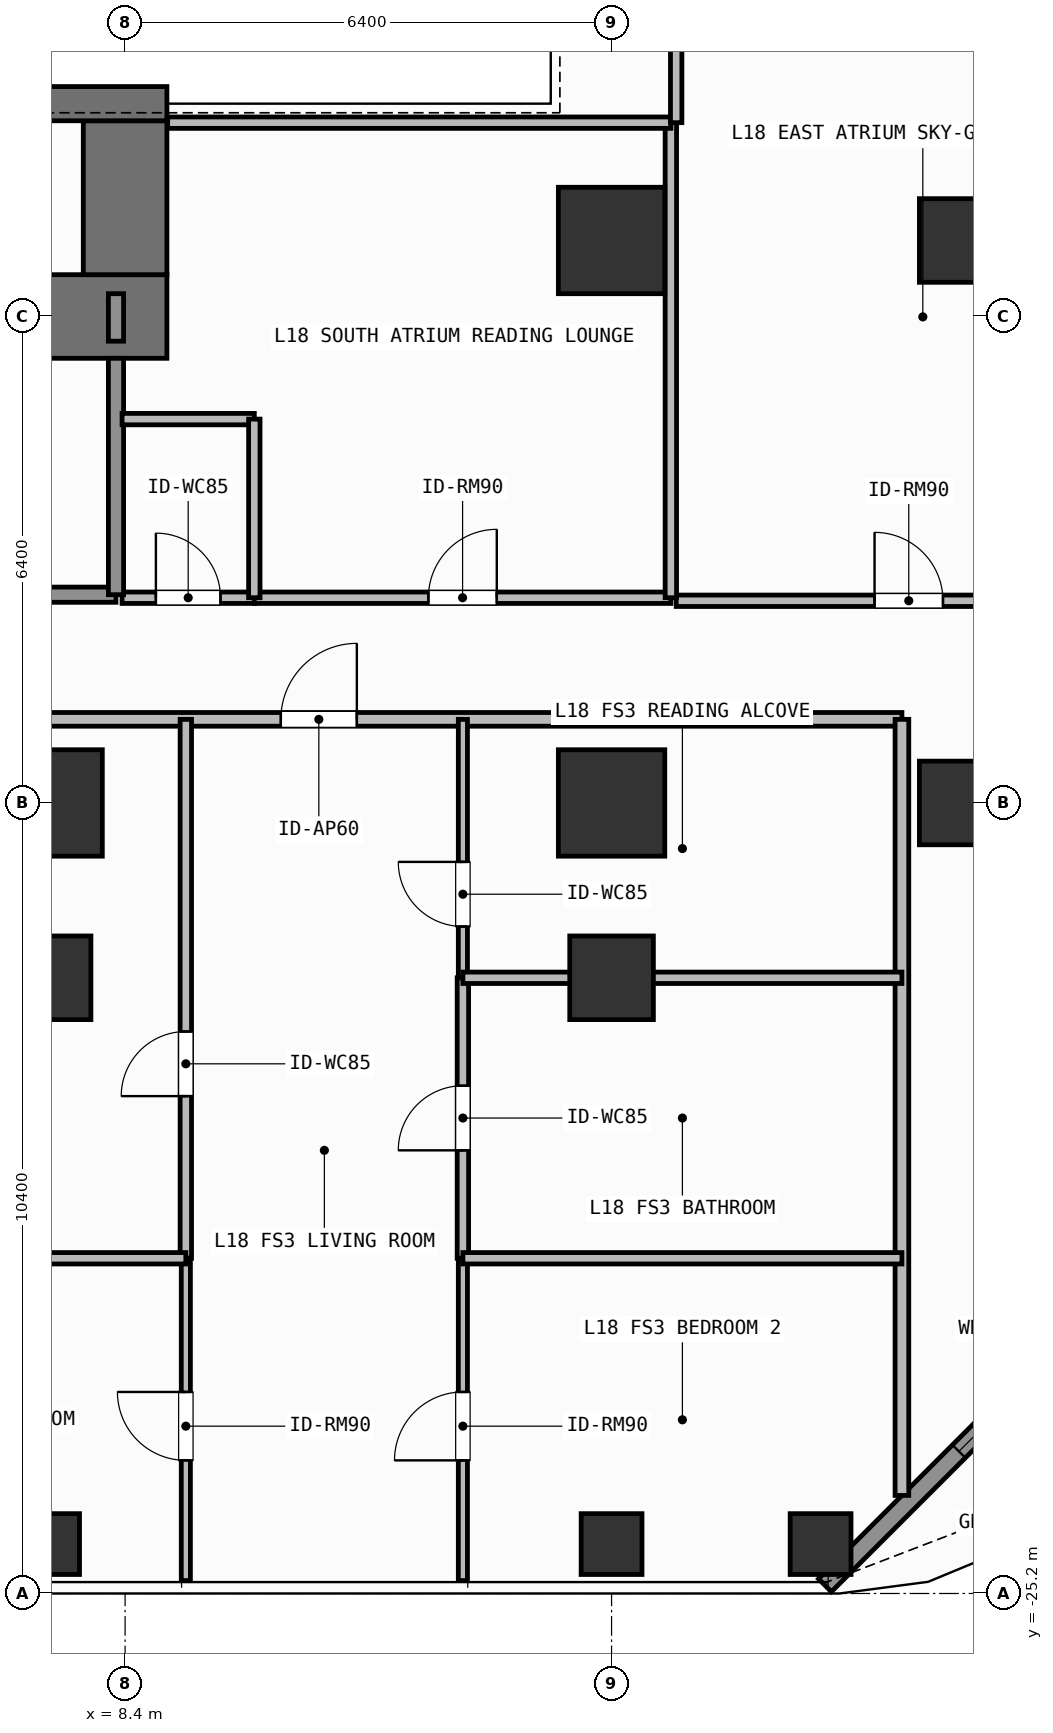
"""IFC4 building model, lengths in metres.
Left out: names, types, materials, properties, quantities, classifications, styles, units other than length and angle.
Written with IfcOpenShell. Run it as: python <this file> out.ifc"""

import sys

from ifc_helpers import new_model, si_unit, direction, frame, frame_2d, origin, origin_2d, place, context, subcontext, project, spatial, rectangle, hollow_rectangle, extrude, element, fill, save


model = new_model("IFC4")
c1 = context("Model", 3, precision=1e-05, world=origin(), true_north=direction((0.0, 1.0)))
c2 = subcontext(c1, "Body", "Model", "MODEL_VIEW")
j1 = project(units=[si_unit("LENGTHUNIT", "METRE"), si_unit("PLANEANGLEUNIT", "RADIAN")], contexts=[c1])
p1 = place(None, origin())
s1 = spatial("IfcSite", under=j1, at=p1, CompositionType="ELEMENT")
p2 = place(p1, origin())
s2 = spatial("IfcBuilding", under=s1, at=p2, CompositionType="ELEMENT")
p3 = place(p2, frame((0.0, 0.0, 69.6)))
s3 = spatial("IfcBuildingStorey", under=s2, at=p3, CompositionType="ELEMENT", Elevation=69.6)
p4 = place(p3, frame((6.12, -8.4, 0.0), z_axis=(0.0, 0.0, 1.0), x_axis=(1.0, 0.0, 0.0)))
e1 = element("IfcWall", 1, at=p4, inside=s3, PredefinedType="SHEAR", context=c2, shape_type="SweptSolid", body=[
    extrude(rectangle(XDim=2.83, YDim=1.1, at=frame_2d((1.415, 0.0))), origin(), (0.0, 0.0, 1.0), 3.9),
])
p5 = place(p3, frame((8.4, -7.85, 0.0), z_axis=(0.0, 0.0, 1.0), x_axis=(0.0, 1.0, 0.0)))
e2 = element("IfcWall", 2, at=p5, inside=s3, PredefinedType="SHEAR", context=c2, shape_type="SweptSolid", body=[
    extrude(rectangle(XDim=2.025, YDim=1.1, at=frame_2d((1.013, 0.0))), origin(), (0.0, 0.0, 1.0), 3.9),
])
p6 = place(p3, frame((3.045, -5.6, 0.0), z_axis=(0.0, 0.0, 1.0), x_axis=(1.0, 0.0, 0.0)))
e3 = element("IfcWall", 3, at=p6, inside=s3, PredefinedType="SHEAR", context=c2, shape_type="SweptSolid", body=[
    extrude(rectangle(XDim=5.905, YDim=0.45, at=frame_2d((2.953, 0.0))), origin(), (0.0, 0.0, 1.0), 3.9),
])
for number, where, z_axis, x_axis in (
    (4, (7.4, -14.8, 0.0), (0.0, 0.0, 1.0), (1.0, 0.0, 0.0)),
    (5, (14.8, -14.8, 0.0), (0.0, 0.0, 1.0), (1.0, 0.0, 0.0)),
    (6, (14.8, -7.4, 0.0), (0.0, 0.0, 1.0), (1.0, 0.0, 0.0)),
):
    element("IfcColumn", number, at=place(p3, frame(where, z_axis=z_axis, x_axis=x_axis)), inside=s3, PredefinedType="COLUMN", context=c2, shape_type="SweptSolid", body=[
        extrude(rectangle(XDim=1.4, YDim=1.4, at=origin_2d()), origin(), (0.0, 0.0, 1.0), 3.9),
    ])
for number, where, z_axis, x_axis in (
    (7, (19.4, -14.8, 0.0), (0.0, 0.0, 1.0), (1.0, 0.0, 0.0)),
    (8, (19.4, -7.4, 0.0), (0.0, 0.0, 1.0), (1.0, 0.0, 0.0)),
    (9, (7.4, -17.1, 0.0), (0.0, 0.0, 1.0), (1.0, 0.0, 0.0)),
    (10, (14.8, -17.1, 0.0), (0.0, 0.0, 1.0), (1.0, 0.0, 0.0)),
):
    element("IfcColumn", number, at=place(p3, frame(where, z_axis=z_axis, x_axis=x_axis)), inside=s3, PredefinedType="COLUMN", context=c2, shape_type="SweptSolid", body=[
        extrude(rectangle(XDim=1.1, YDim=1.1, at=origin_2d()), origin(), (0.0, 0.0, 1.0), 3.9),
    ])
for number, where, z_axis, x_axis in (
    (11, (17.55, -24.55, 0.0), (0.0, 0.0, 1.0), (1.0, 0.0, 0.0)),
    (12, (7.4, -24.55, 0.0), (0.0, 0.0, 1.0), (1.0, 0.0, 0.0)),
    (13, (14.8, -24.55, 0.0), (0.0, 0.0, 1.0), (1.0, 0.0, 0.0)),
):
    element("IfcColumn", number, at=place(p3, frame(where, z_axis=z_axis, x_axis=x_axis)), inside=s3, PredefinedType="COLUMN", context=c2, shape_type="SweptSolid", body=[
        extrude(hollow_rectangle(XDim=0.8, YDim=0.8, WallThickness=0.036, at=origin_2d()), origin(), (0.0, 0.0, 1.0), 3.9),
    ])
p7 = place(p3, frame((22.192, -20.508, 0.0), z_axis=(0.0, 0.0, 1.0), x_axis=(-0.707106781187, -0.707106781187, 0.0)))
e14 = element("IfcWall", 14, at=p7, inside=s3, PredefinedType="SOLIDWALL", context=c2, shape_type="SweptSolid", body=[
    extrude(rectangle(XDim=6.484, YDim=0.24, at=frame_2d((3.242, 0.0))), origin(), (0.0, 0.0, 1.0), 3.68),
])
p8 = place(p7, frame((2.492, 0.0, 0.8)))
e15 = element("IfcOpeningElement", 15, at=p8, cuts=e14, PredefinedType="OPENING", context=c2, shape_type="SweptSolid", body=[
    extrude(rectangle(XDim=1.5, YDim=1.85, at=frame_2d((0.75, 0.925))), frame((0.0, 0.13, 0.0), z_axis=(0.0, -1.0, 0.0), x_axis=(1.0, 0.0, 0.0)), (0.0, 0.0, 1.0), 0.26),
])
p9 = place(p3, frame((4.58, -12.06, 0.0), z_axis=(0.0, 0.0, 1.0), x_axis=(1.0, 0.0, 0.0)))
e16 = element("IfcWall", 16, at=p9, inside=s3, PredefinedType="SOLIDWALL", context=c2, shape_type="SweptSolid", body=[
    extrude(rectangle(XDim=3.7, YDim=0.2, at=frame_2d((1.85, 0.0))), origin(), (0.0, 0.0, 1.0), 3.68),
])
p10 = place(p9, frame((1.212, 0.0, 0.0)))
e17 = element("IfcOpeningElement", 17, at=p10, cuts=e16, PredefinedType="OPENING", context=c2, shape_type="SweptSolid", body=[
    extrude(rectangle(XDim=1.1, YDim=2.15, at=frame_2d((0.55, 1.075))), frame((0.0, 0.11, 0.0), z_axis=(0.0, -1.0, 0.0), x_axis=(1.0, 0.0, 0.0)), (0.0, 0.0, 1.0), 0.22),
])
p11 = place(p3, frame((8.36, -12.1, 0.0), z_axis=(0.0, 0.0, 1.0), x_axis=(1.0, 0.0, 0.0)))
e18 = element("IfcWall", 18, at=p11, inside=s3, PredefinedType="PARTITIONING", context=c2, shape_type="SweptSolid", body=[
    extrude(rectangle(XDim=1.74, YDim=0.15, at=frame_2d((0.87, 0.0))), origin(), (0.0, 0.0, 1.0), 3.68),
])
p12 = place(p11, frame((0.445, 0.0, 0.0)))
e19 = element("IfcOpeningElement", 19, at=p12, cuts=e18, PredefinedType="OPENING", context=c2, shape_type="SweptSolid", body=[
    extrude(rectangle(XDim=0.85, YDim=2.1, at=frame_2d((0.425, 1.05))), frame((0.0, 0.085, 0.0), z_axis=(0.0, -1.0, 0.0), x_axis=(1.0, 0.0, 0.0)), (0.0, 0.0, 1.0), 0.17),
])
p13 = place(p3, frame((10.1, -12.1, 0.0), z_axis=(0.0, 0.0, 1.0), x_axis=(1.0, 0.0, 0.0)))
e20 = element("IfcWall", 20, at=p13, inside=s3, PredefinedType="PARTITIONING", context=c2, shape_type="SweptSolid", body=[
    extrude(rectangle(XDim=5.48, YDim=0.15, at=frame_2d((2.74, 0.0))), origin(), (0.0, 0.0, 1.0), 3.68),
])
p14 = place(p13, frame((2.29, 0.0, 0.0)))
e21 = element("IfcOpeningElement", 21, at=p14, cuts=e20, PredefinedType="OPENING", context=c2, shape_type="SweptSolid", body=[
    extrude(rectangle(XDim=0.9, YDim=2.1, at=frame_2d((0.45, 1.05))), frame((0.0, 0.085, 0.0), z_axis=(0.0, -1.0, 0.0), x_axis=(1.0, 0.0, 0.0)), (0.0, 0.0, 1.0), 0.17),
])
p15 = place(p3, frame((2.918, -13.7, 0.0), z_axis=(0.0, 0.0, 1.0), x_axis=(1.0, 0.0, 0.0)))
e22 = element("IfcWall", 22, at=p15, inside=s3, PredefinedType="PARTITIONING", context=c2, shape_type="SweptSolid", body=[
    extrude(rectangle(XDim=15.702, YDim=0.18, at=frame_2d((7.851, 0.0))), origin(), (0.0, 0.0, 1.0), 3.68),
])
p16 = place(p15, frame((7.531, 0.0, 0.0)))
e23 = element("IfcOpeningElement", 23, at=p16, cuts=e22, PredefinedType="OPENING", context=c2, shape_type="SweptSolid", body=[
    extrude(rectangle(XDim=1.0, YDim=2.2, at=frame_2d((0.5, 1.1))), frame((0.0, 0.1, 0.0), z_axis=(0.0, -1.0, 0.0), x_axis=(1.0, 0.0, 0.0)), (0.0, 0.0, 1.0), 0.2),
])
p17 = place(p3, frame((9.199, -20.79, 0.0), z_axis=(0.0, 0.0, 1.0), x_axis=(0.0, 1.0, 0.0)))
e24 = element("IfcWall", 24, at=p17, inside=s3, PredefinedType="PARTITIONING", context=c2, shape_type="SweptSolid", body=[
    extrude(rectangle(XDim=7.09, YDim=0.15, at=frame_2d((3.545, 0.0))), origin(), (0.0, 0.0, 1.0), 3.68),
])
p18 = place(p17, frame((2.133, 0.0, 0.0)))
e25 = element("IfcOpeningElement", 25, at=p18, cuts=e24, PredefinedType="OPENING", context=c2, shape_type="SweptSolid", body=[
    extrude(rectangle(XDim=0.85, YDim=2.1, at=frame_2d((0.425, 1.05))), frame((0.0, 0.085, 0.0), z_axis=(0.0, -1.0, 0.0), x_axis=(1.0, 0.0, 0.0)), (0.0, 0.0, 1.0), 0.17),
])
p19 = place(p3, frame((9.199, -25.03, 0.0), z_axis=(0.0, 0.0, 1.0), x_axis=(0.0, 1.0, 0.0)))
e26 = element("IfcWall", 26, at=p19, inside=s3, PredefinedType="PARTITIONING", context=c2, shape_type="SweptSolid", body=[
    extrude(rectangle(XDim=4.24, YDim=0.12, at=frame_2d((2.12, 0.0))), origin(), (0.0, 0.0, 1.0), 3.68),
])
p20 = place(p19, frame((1.581, 0.0, 0.0)))
e27 = element("IfcOpeningElement", 27, at=p20, cuts=e26, PredefinedType="OPENING", context=c2, shape_type="SweptSolid", body=[
    extrude(rectangle(XDim=0.9, YDim=2.1, at=frame_2d((0.45, 1.05))), frame((0.0, 0.07, 0.0), z_axis=(0.0, -1.0, 0.0), x_axis=(1.0, 0.0, 0.0)), (0.0, 0.0, 1.0), 0.14),
])
p21 = place(p3, frame((12.844, -20.79, 0.0), z_axis=(0.0, 0.0, 1.0), x_axis=(0.0, 1.0, 0.0)))
e28 = element("IfcWall", 28, at=p21, inside=s3, PredefinedType="PARTITIONING", context=c2, shape_type="SweptSolid", body=[
    extrude(rectangle(XDim=3.69, YDim=0.15, at=frame_2d((1.845, 0.0))), origin(), (0.0, 0.0, 1.0), 3.68),
])
p22 = place(p21, frame((1.42, 0.0, 0.0)))
e29 = element("IfcOpeningElement", 29, at=p22, cuts=e28, PredefinedType="OPENING", context=c2, shape_type="SweptSolid", body=[
    extrude(rectangle(XDim=0.85, YDim=2.1, at=frame_2d((0.425, 1.05))), frame((0.0, 0.085, 0.0), z_axis=(0.0, -1.0, 0.0), x_axis=(1.0, 0.0, 0.0)), (0.0, 0.0, 1.0), 0.17),
])
p23 = place(p3, frame((12.844, -17.1, 0.0), z_axis=(0.0, 0.0, 1.0), x_axis=(0.0, 1.0, 0.0)))
e30 = element("IfcWall", 30, at=p23, inside=s3, PredefinedType="PARTITIONING", context=c2, shape_type="SweptSolid", body=[
    extrude(rectangle(XDim=3.4, YDim=0.12, at=frame_2d((1.7, 0.0))), origin(), (0.0, 0.0, 1.0), 3.68),
])
p24 = place(p23, frame((0.675, 0.0, 0.0)))
e31 = element("IfcOpeningElement", 31, at=p24, cuts=e30, PredefinedType="OPENING", context=c2, shape_type="SweptSolid", body=[
    extrude(rectangle(XDim=0.85, YDim=2.1, at=frame_2d((0.425, 1.05))), frame((0.0, 0.07, 0.0), z_axis=(0.0, -1.0, 0.0), x_axis=(1.0, 0.0, 0.0)), (0.0, 0.0, 1.0), 0.14),
])
p25 = place(p3, frame((12.844, -25.03, 0.0), z_axis=(0.0, 0.0, 1.0), x_axis=(0.0, 1.0, 0.0)))
e32 = element("IfcWall", 32, at=p25, inside=s3, PredefinedType="PARTITIONING", context=c2, shape_type="SweptSolid", body=[
    extrude(rectangle(XDim=4.24, YDim=0.12, at=frame_2d((2.12, 0.0))), origin(), (0.0, 0.0, 1.0), 3.68),
])
p26 = place(p25, frame((1.581, 0.0, 0.0)))
e33 = element("IfcOpeningElement", 33, at=p26, cuts=e32, PredefinedType="OPENING", context=c2, shape_type="SweptSolid", body=[
    extrude(rectangle(XDim=0.9, YDim=2.1, at=frame_2d((0.45, 1.05))), frame((0.0, 0.07, 0.0), z_axis=(0.0, -1.0, 0.0), x_axis=(1.0, 0.0, 0.0)), (0.0, 0.0, 1.0), 0.14),
])
p27 = place(p3, frame((15.65, -12.14, 0.0), z_axis=(0.0, 0.0, 1.0), x_axis=(1.0, 0.0, 0.0)))
e34 = element("IfcWall", 34, at=p27, inside=s3, PredefinedType="PARTITIONING", context=c2, shape_type="SweptSolid", body=[
    extrude(rectangle(XDim=6.47, YDim=0.15, at=frame_2d((3.235, 0.0))), origin(), (0.0, 0.0, 1.0), 3.68),
])
p28 = place(p27, frame((2.61, 0.0, 0.0)))
e35 = element("IfcOpeningElement", 35, at=p28, cuts=e34, PredefinedType="OPENING", context=c2, shape_type="SweptSolid", body=[
    extrude(rectangle(XDim=0.9, YDim=2.1, at=frame_2d((0.45, 1.05))), frame((0.0, 0.085, 0.0), z_axis=(0.0, -1.0, 0.0), x_axis=(1.0, 0.0, 0.0)), (0.0, 0.0, 1.0), 0.17),
])
p29 = place(p3, frame((8.28, -12.06, 0.0), z_axis=(0.0, 0.0, 1.0), x_axis=(0.0, 1.0, 0.0)))
e36 = element("IfcWall", 36, at=p29, inside=s3, PredefinedType="SOLIDWALL", context=c2, shape_type="SweptSolid", body=[
    extrude(rectangle(XDim=3.11, YDim=0.2, at=frame_2d((1.555, 0.0))), origin(), (0.0, 0.0, 1.0), 3.68),
])
p30 = place(p3, frame((8.28, -8.725, 0.0), z_axis=(0.0, 0.0, 1.0), x_axis=(0.0, 1.0, 0.0)))
e37 = element("IfcWall", 37, at=p30, inside=s3, PredefinedType="SOLIDWALL", context=c2, shape_type="SweptSolid", body=[
    extrude(rectangle(XDim=0.625, YDim=0.2, at=frame_2d((0.312, 0.0))), origin(), (0.0, 0.0, 1.0), 3.68),
])
p31 = place(p3, frame((8.36, -9.75, 0.0), z_axis=(0.0, 0.0, 1.0), x_axis=(1.0, 0.0, 0.0)))
e38 = element("IfcWall", 38, at=p31, inside=s3, PredefinedType="PARTITIONING", context=c2, shape_type="SweptSolid", body=[
    extrude(rectangle(XDim=1.74, YDim=0.15, at=frame_2d((0.87, 0.0))), origin(), (0.0, 0.0, 1.0), 3.68),
])
p32 = place(p3, frame((10.1, -12.1, 0.0), z_axis=(0.0, 0.0, 1.0), x_axis=(0.0, 1.0, 0.0)))
e39 = element("IfcWall", 39, at=p32, inside=s3, PredefinedType="PARTITIONING", context=c2, shape_type="SweptSolid", body=[
    extrude(rectangle(XDim=2.35, YDim=0.15, at=frame_2d((1.175, 0.0))), origin(), (0.0, 0.0, 1.0), 3.68),
])
p33 = place(p3, frame((15.58, -12.1, 0.0), z_axis=(0.0, 0.0, 1.0), x_axis=(0.0, 1.0, 0.0)))
e40 = element("IfcWall", 40, at=p33, inside=s3, PredefinedType="PARTITIONING", context=c2, shape_type="SweptSolid", body=[
    extrude(rectangle(XDim=6.25, YDim=0.15, at=frame_2d((3.125, 0.0))), origin(), (0.0, 0.0, 1.0), 3.68),
])
p34 = place(p3, frame((8.96, -5.85, 0.0), z_axis=(0.0, 0.0, 1.0), x_axis=(1.0, 0.0, 0.0)))
e41 = element("IfcWall", 41, at=p34, inside=s3, PredefinedType="PARTITIONING", context=c2, shape_type="SweptSolid", body=[
    extrude(rectangle(XDim=6.62, YDim=0.15, at=frame_2d((3.31, 0.0))), origin(), (0.0, 0.0, 1.0), 3.68),
])
p35 = place(p3, frame((18.62, -23.91, 0.0), z_axis=(0.0, 0.0, 1.0), x_axis=(0.0, 1.0, 0.0)))
e42 = element("IfcWall", 42, at=p35, inside=s3, PredefinedType="PARTITIONING", context=c2, shape_type="SweptSolid", body=[
    extrude(rectangle(XDim=10.21, YDim=0.18, at=frame_2d((5.105, 0.0))), origin(), (0.0, 0.0, 1.0), 3.68),
])
p36 = place(p3, frame((2.918, -20.79, 0.0), z_axis=(0.0, 0.0, 1.0), x_axis=(1.0, 0.0, 0.0)))
e43 = element("IfcWall", 43, at=p36, inside=s3, PredefinedType="PARTITIONING", context=c2, shape_type="SweptSolid", body=[
    extrude(rectangle(XDim=6.281, YDim=0.15, at=frame_2d((3.141, 0.0))), origin(), (0.0, 0.0, 1.0), 3.68),
])
p37 = place(p3, frame((12.844, -17.1, 0.0), z_axis=(0.0, 0.0, 1.0), x_axis=(1.0, 0.0, 0.0)))
e44 = element("IfcWall", 44, at=p37, inside=s3, PredefinedType="PARTITIONING", context=c2, shape_type="SweptSolid", body=[
    extrude(rectangle(XDim=5.776, YDim=0.15, at=frame_2d((2.888, 0.0))), origin(), (0.0, 0.0, 1.0), 3.082),
])
p38 = place(p3, frame((12.844, -20.79, 0.0), z_axis=(0.0, 0.0, 1.0), x_axis=(1.0, 0.0, 0.0)))
e45 = element("IfcWall", 45, at=p38, inside=s3, PredefinedType="PARTITIONING", context=c2, shape_type="SweptSolid", body=[
    extrude(rectangle(XDim=5.776, YDim=0.15, at=frame_2d((2.888, 0.0))), origin(), (0.0, 0.0, 1.0), 3.68),
])
p39 = place(p3, frame((15.65, -5.85, 0.0), z_axis=(0.0, 0.0, 1.0), x_axis=(0.0, 1.0, 0.0)))
e46 = element("IfcWall", 46, at=p39, inside=s3, PredefinedType="PARTITIONING", context=c2, shape_type="SweptSolid", body=[
    extrude(rectangle(XDim=1.2, YDim=0.15, at=frame_2d((0.6, 0.0))), origin(), (0.0, 0.0, 1.0), 3.68),
])
p40 = place(p8, origin())
e47 = element("IfcWindow", 47, at=p40, inside=s3, PartitioningType="SINGLE_PANEL", PredefinedType="WINDOW", context=c2, shape_type="SweptSolid", body=[
    extrude(rectangle(XDim=1.5, YDim=1.85, at=frame_2d((0.75, 0.925))), frame((0.0, 0.03, 0.0), z_axis=(0.0, -1.0, 0.0), x_axis=(1.0, 0.0, 0.0)), (0.0, 0.0, 1.0), 0.06),
])
fill(e15, e47)
p41 = place(p12, origin())
e48 = element("IfcDoor", 48, at=p41, inside=s3, OperationType="SINGLE_SWING_LEFT", PredefinedType="DOOR", context=c2, shape_type="SweptSolid", body=[
    extrude(rectangle(XDim=0.85, YDim=2.1, at=frame_2d((0.425, 1.05))), frame((0.0, 0.025, 0.0), z_axis=(0.0, -1.0, 0.0), x_axis=(1.0, 0.0, 0.0)), (0.0, 0.0, 1.0), 0.05),
])
fill(e19, e48)
p42 = place(p14, origin())
e49 = element("IfcDoor", 49, at=p42, inside=s3, OperationType="SINGLE_SWING_RIGHT", PredefinedType="DOOR", context=c2, shape_type="SweptSolid", body=[
    extrude(rectangle(XDim=0.9, YDim=2.1, at=frame_2d((0.45, 1.05))), frame((0.0, 0.025, 0.0), z_axis=(0.0, -1.0, 0.0), x_axis=(1.0, 0.0, 0.0)), (0.0, 0.0, 1.0), 0.05),
])
fill(e21, e49)
p43 = place(p16, origin())
e50 = element("IfcDoor", 50, at=p43, inside=s3, OperationType="SINGLE_SWING_RIGHT", PredefinedType="DOOR", context=c2, shape_type="SweptSolid", body=[
    extrude(rectangle(XDim=1.0, YDim=2.2, at=frame_2d((0.5, 1.1))), frame((0.0, 0.025, 0.0), z_axis=(0.0, -1.0, 0.0), x_axis=(1.0, 0.0, 0.0)), (0.0, 0.0, 1.0), 0.05),
])
fill(e23, e50)
p44 = place(p18, origin())
e51 = element("IfcDoor", 51, at=p44, inside=s3, OperationType="SINGLE_SWING_LEFT", PredefinedType="DOOR", context=c2, shape_type="SweptSolid", body=[
    extrude(rectangle(XDim=0.85, YDim=2.1, at=frame_2d((0.425, 1.05))), frame((0.0, 0.025, 0.0), z_axis=(0.0, -1.0, 0.0), x_axis=(1.0, 0.0, 0.0)), (0.0, 0.0, 1.0), 0.05),
])
fill(e25, e51)
p45 = place(p20, origin())
e52 = element("IfcDoor", 52, at=p45, inside=s3, OperationType="SINGLE_SWING_RIGHT", PredefinedType="DOOR", context=c2, shape_type="SweptSolid", body=[
    extrude(rectangle(XDim=0.9, YDim=2.1, at=frame_2d((0.45, 1.05))), frame((0.0, 0.025, 0.0), z_axis=(0.0, -1.0, 0.0), x_axis=(1.0, 0.0, 0.0)), (0.0, 0.0, 1.0), 0.05),
])
fill(e27, e52)
p46 = place(p22, origin())
e53 = element("IfcDoor", 53, at=p46, inside=s3, OperationType="SINGLE_SWING_LEFT", PredefinedType="DOOR", context=c2, shape_type="SweptSolid", body=[
    extrude(rectangle(XDim=0.85, YDim=2.1, at=frame_2d((0.425, 1.05))), frame((0.0, 0.025, 0.0), z_axis=(0.0, -1.0, 0.0), x_axis=(1.0, 0.0, 0.0)), (0.0, 0.0, 1.0), 0.05),
])
fill(e29, e53)
p47 = place(p24, origin())
e54 = element("IfcDoor", 54, at=p47, inside=s3, OperationType="SINGLE_SWING_RIGHT", PredefinedType="DOOR", context=c2, shape_type="SweptSolid", body=[
    extrude(rectangle(XDim=0.85, YDim=2.1, at=frame_2d((0.425, 1.05))), frame((0.0, 0.025, 0.0), z_axis=(0.0, -1.0, 0.0), x_axis=(1.0, 0.0, 0.0)), (0.0, 0.0, 1.0), 0.05),
])
fill(e31, e54)
p48 = place(p26, origin())
e55 = element("IfcDoor", 55, at=p48, inside=s3, OperationType="SINGLE_SWING_LEFT", PredefinedType="DOOR", context=c2, shape_type="SweptSolid", body=[
    extrude(rectangle(XDim=0.9, YDim=2.1, at=frame_2d((0.45, 1.05))), frame((0.0, 0.025, 0.0), z_axis=(0.0, -1.0, 0.0), x_axis=(1.0, 0.0, 0.0)), (0.0, 0.0, 1.0), 0.05),
])
fill(e33, e55)
p49 = place(p28, origin())
e56 = element("IfcDoor", 56, at=p49, inside=s3, OperationType="SINGLE_SWING_LEFT", PredefinedType="DOOR", context=c2, shape_type="SweptSolid", body=[
    extrude(rectangle(XDim=0.9, YDim=2.1, at=frame_2d((0.45, 1.05))), frame((0.0, 0.025, 0.0), z_axis=(0.0, -1.0, 0.0), x_axis=(1.0, 0.0, 0.0)), (0.0, 0.0, 1.0), 0.05),
])
fill(e35, e56)
save(model, sys.argv[1])
